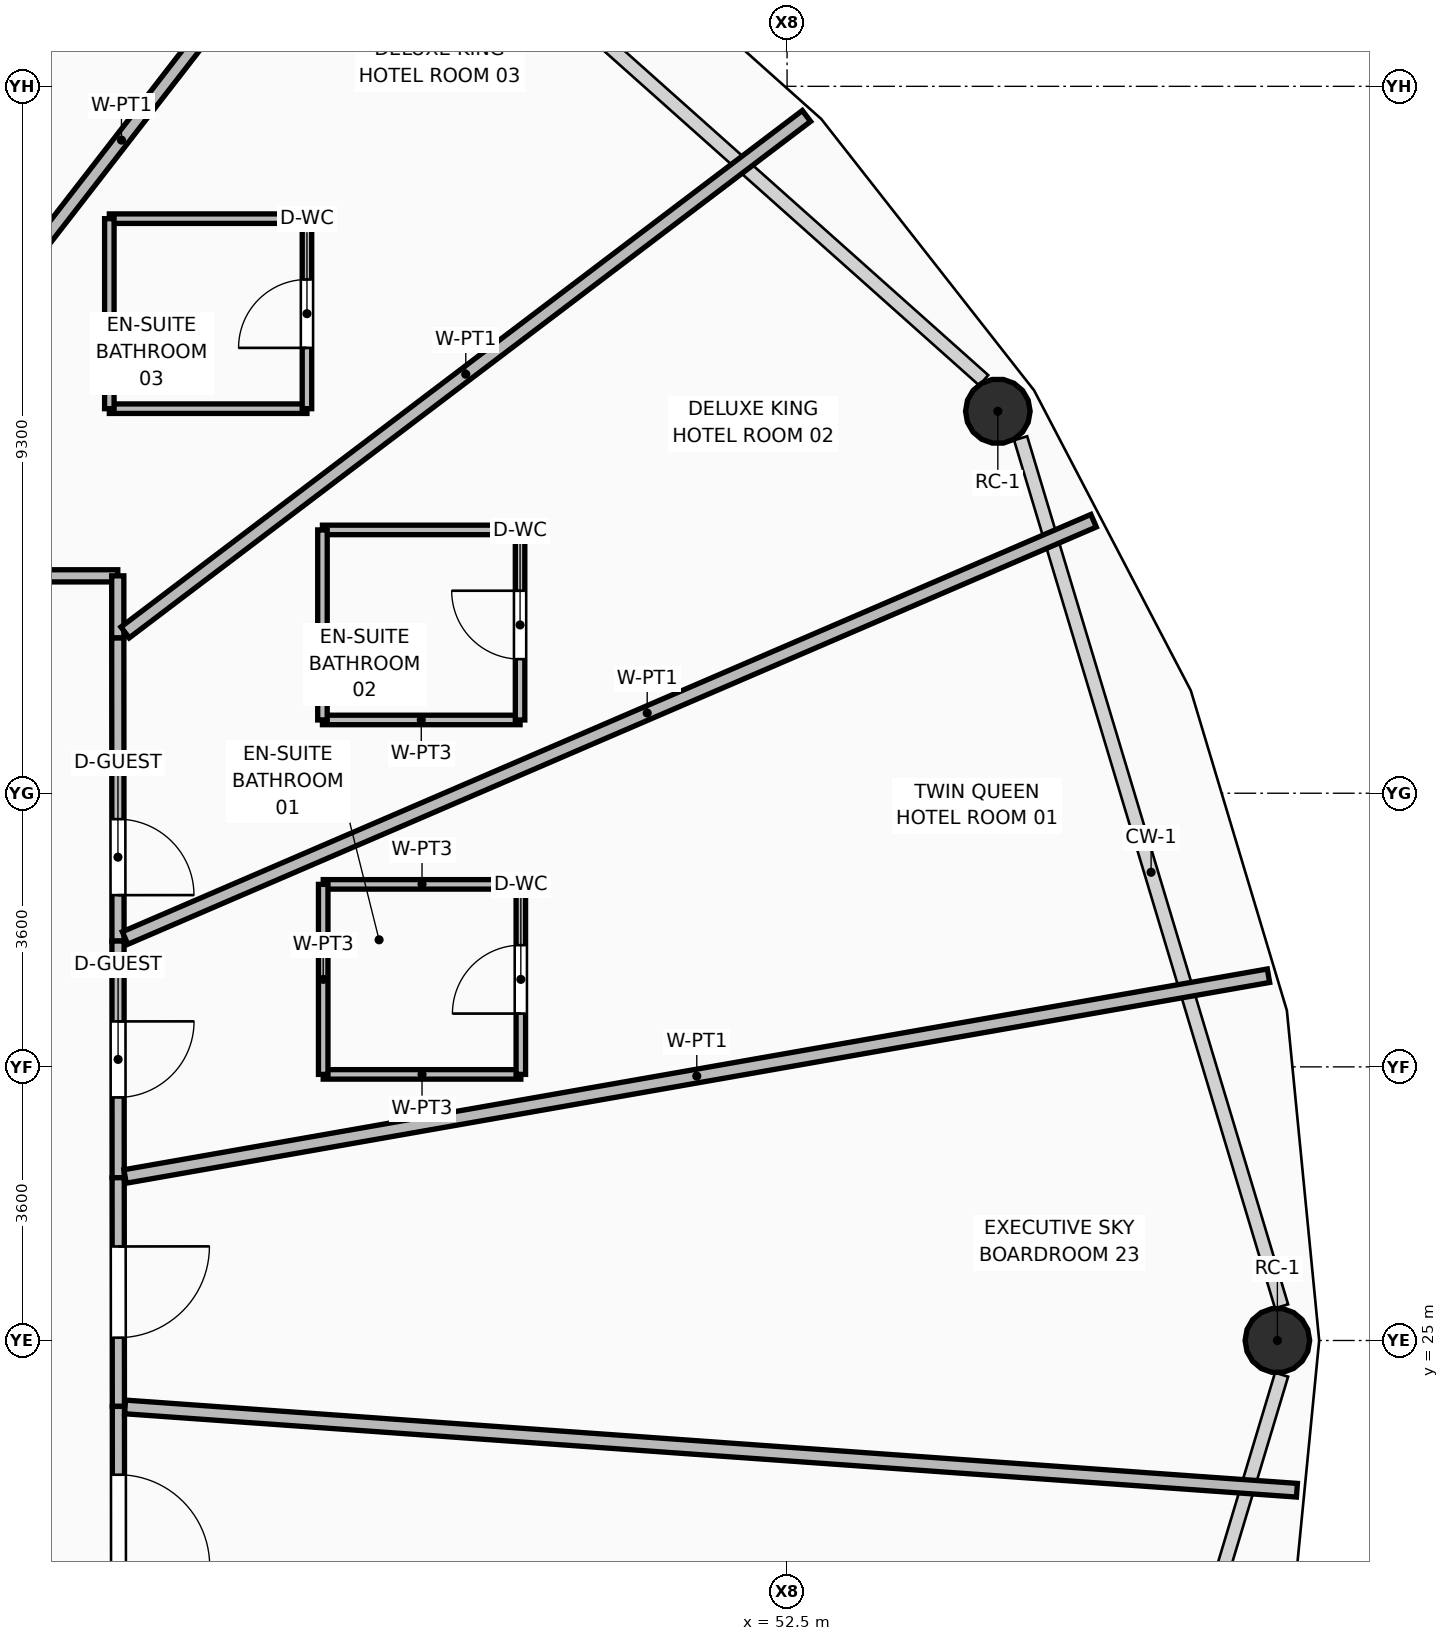
"""IFC4 building model, lengths in metres.
Left out: names, types, materials, properties, quantities, classifications, styles, units other than length and angle.
Written with IfcOpenShell. Run it as: python <this file> out.ifc"""

import sys

from ifc_helpers import new_model, si_unit, direction, frame, frame_2d, origin, origin_2d, place, context, subcontext, project, spatial, rectangle, hollow_circle, extrude, element, fill, save


model = new_model("IFC4")
c1 = context("Model", 3, precision=1e-05, world=origin(), true_north=direction((0.0, 1.0)))
c2 = subcontext(c1, "Body", "Model", "MODEL_VIEW")
j1 = project(units=[si_unit("LENGTHUNIT", "METRE"), si_unit("PLANEANGLEUNIT", "RADIAN")], contexts=[c1])
p1 = place(None, origin())
s1 = spatial("IfcSite", under=j1, at=p1, CompositionType="ELEMENT")
p2 = place(p1, origin())
s2 = spatial("IfcBuilding", under=s1, at=p2, CompositionType="ELEMENT")
p3 = place(p2, frame((0.0, 0.0, 64.5)))
s3 = spatial("IfcBuildingStorey", under=s2, at=p3, CompositionType="ELEMENT", Elevation=64.5)
p4 = place(p3, frame((58.951, 25.0, 0.0), z_axis=(0.055647755416, 0.0, 0.998450463126), x_axis=(0.0, 1.0, 0.0)))
e1 = element("IfcColumn", 1, at=p4, inside=s3, PredefinedType="COLUMN", context=c2, shape_type="SweptSolid", body=[
    extrude(hollow_circle(Radius=0.425, WallThickness=0.04, at=origin_2d()), origin(), (0.0, 0.0, 1.0), 3.576),
])
p5 = place(p3, frame((55.273, 37.225, 0.0), z_axis=(0.046416301988, 0.02383009016, 0.998637899197), x_axis=(-0.456724176891, 0.889608355538, 0.0)))
e2 = element("IfcColumn", 2, at=p5, inside=s3, PredefinedType="COLUMN", context=c2, shape_type="SweptSolid", body=[
    extrude(hollow_circle(Radius=0.425, WallThickness=0.04, at=origin_2d()), origin(), (0.0, 0.0, 1.0), 3.729),
])
p6 = place(p3, frame((39.299, 35.06, 0.0), z_axis=(0.0, 0.0, 1.0), x_axis=(1.0, 0.0, 0.0)))
e3 = element("IfcWall", 3, at=p6, inside=s3, PredefinedType="PARTITIONING", context=c2, shape_type="SweptSolid", body=[
    extrude(rectangle(XDim=4.395, YDim=0.16, at=frame_2d((2.198, 0.0))), origin(), (0.0, 0.0, 1.0), 2.888),
])
p7 = place(p6, frame((0.599, 0.0, 0.0)))
e4 = element("IfcOpeningElement", 4, at=p7, cuts=e3, PredefinedType="OPENING", context=c2, shape_type="SweptSolid", body=[
    extrude(rectangle(XDim=1.0, YDim=2.1, at=frame_2d((0.5, 1.05))), frame((0.0, 0.09, 0.0), z_axis=(0.0, -1.0, 0.0), x_axis=(1.0, 0.0, 0.0)), (0.0, 0.0, 1.0), 0.18),
])
p8 = place(p3, frame((43.694, 35.06, 0.0), z_axis=(0.0, 0.0, 1.0), x_axis=(0.0, -1.0, 0.0)))
e5 = element("IfcWall", 5, at=p8, inside=s3, PredefinedType="PARTITIONING", context=c2, shape_type="SweptSolid", body=[
    extrude(rectangle(XDim=0.818, YDim=0.16, at=frame_2d((0.409, 0.0))), origin(), (0.0, 0.0, 1.0), 3.55),
])
p9 = place(p3, frame((43.694, 34.242, 0.0), z_axis=(0.0, 0.0, 1.0), x_axis=(0.00073479865, -0.999999730035, 0.0)))
e6 = element("IfcWall", 6, at=p9, inside=s3, PredefinedType="PARTITIONING", context=c2, shape_type="SweptSolid", body=[
    extrude(rectangle(XDim=3.987, YDim=0.16, at=frame_2d((1.994, 0.0))), origin(), (0.0, 0.0, 1.0), 2.888),
])
p10 = place(p9, frame((2.383, 0.0, 0.0)))
e7 = element("IfcOpeningElement", 7, at=p10, cuts=e6, PredefinedType="OPENING", context=c2, shape_type="SweptSolid", body=[
    extrude(rectangle(XDim=1.0, YDim=2.1, at=frame_2d((0.5, 1.05))), frame((0.0, 0.09, 0.0), z_axis=(0.0, -1.0, 0.0), x_axis=(1.0, 0.0, 0.0)), (0.0, 0.0, 1.0), 0.18),
])
p11 = place(p3, frame((43.697, 30.255, 0.0), z_axis=(0.0, 0.0, 1.0), x_axis=(0.000627450857, -0.999999803153, 0.0)))
e8 = element("IfcWall", 8, at=p11, inside=s3, PredefinedType="PARTITIONING", context=c2, shape_type="SweptSolid", body=[
    extrude(rectangle(XDim=3.113, YDim=0.16, at=frame_2d((1.556, 0.0))), origin(), (0.0, 0.0, 1.0), 3.55),
])
p12 = place(p11, frame((1.057, 0.0, 0.0)))
e9 = element("IfcOpeningElement", 9, at=p12, cuts=e8, PredefinedType="OPENING", context=c2, shape_type="SweptSolid", body=[
    extrude(rectangle(XDim=1.0, YDim=2.1, at=frame_2d((0.5, 1.05))), frame((0.0, 0.09, 0.0), z_axis=(0.0, -1.0, 0.0), x_axis=(1.0, 0.0, 0.0)), (0.0, 0.0, 1.0), 0.18),
])
p13 = place(p3, frame((43.699, 27.142, 0.0), z_axis=(0.0, 0.0, 1.0), x_axis=(0.00097363037, -0.999999526022, 0.0)))
e10 = element("IfcWall", 10, at=p13, inside=s3, PredefinedType="PARTITIONING", context=c2, shape_type="SweptSolid", body=[
    extrude(rectangle(XDim=3.009, YDim=0.16, at=frame_2d((1.504, 0.0))), origin(), (0.0, 0.0, 1.0), 3.55),
])
p14 = place(p13, frame((0.905, 0.0, 0.0)))
e11 = element("IfcOpeningElement", 11, at=p14, cuts=e10, PredefinedType="OPENING", context=c2, shape_type="SweptSolid", body=[
    extrude(rectangle(XDim=1.2, YDim=2.1, at=frame_2d((0.6, 1.05))), frame((0.0, 0.09, 0.0), z_axis=(0.0, -1.0, 0.0), x_axis=(1.0, 0.0, 0.0)), (0.0, 0.0, 1.0), 0.18),
])
p15 = place(p3, frame((43.702, 24.133, 0.0), z_axis=(0.0, 0.0, 1.0), x_axis=(0.000698649108, -0.999999755945, 0.0)))
e12 = element("IfcWall", 12, at=p15, inside=s3, PredefinedType="PARTITIONING", context=c2, shape_type="SweptSolid", body=[
    extrude(rectangle(XDim=3.145, YDim=0.16, at=frame_2d((1.573, 0.0))), origin(), (0.0, 0.0, 1.0), 2.928),
])
p16 = place(p15, frame((0.899, 0.0, 0.0)))
e13 = element("IfcOpeningElement", 13, at=p16, cuts=e12, PredefinedType="OPENING", context=c2, shape_type="SweptSolid", body=[
    extrude(rectangle(XDim=1.2, YDim=2.1, at=frame_2d((0.6, 1.05))), frame((0.0, 0.09, 0.0), z_axis=(0.0, -1.0, 0.0), x_axis=(1.0, 0.0, 0.0)), (0.0, 0.0, 1.0), 0.18),
])
p17 = place(p3, frame((43.79, 27.158, 0.0), z_axis=(0.0, 0.0, 1.0), x_axis=(0.984936685783, 0.172915369471, 0.0)))
e14 = element("IfcWall", 14, at=p17, inside=s3, PredefinedType="PARTITIONING", context=c2, shape_type="SweptSolid", body=[
    extrude(rectangle(XDim=15.274, YDim=0.18, at=frame_2d((7.637, 0.0))), origin(), (0.0, 0.0, 1.0), 2.735),
])
p18 = place(p3, frame((43.79, 30.295, 0.0), z_axis=(0.0, 0.0, 1.0), x_axis=(0.918393435046, 0.395668419846, 0.0)))
e15 = element("IfcWall", 15, at=p18, inside=s3, PredefinedType="PARTITIONING", context=c2, shape_type="SweptSolid", body=[
    extrude(rectangle(XDim=13.875, YDim=0.18, at=frame_2d((6.938, 0.0))), origin(), (0.0, 0.0, 1.0), 2.735),
])
p19 = place(p3, frame((43.79, 34.315, 0.0), z_axis=(0.0, 0.0, 1.0), x_axis=(0.796937326032, 0.604061998786, 0.0)))
e16 = element("IfcWall", 16, at=p19, inside=s3, PredefinedType="PARTITIONING", context=c2, shape_type="SweptSolid", body=[
    extrude(rectangle(XDim=11.249, YDim=0.18, at=frame_2d((5.625, 0.0))), origin(), (0.0, 0.0, 1.0), 2.735),
])
p20 = place(p3, frame((39.361, 35.14, 0.0), z_axis=(0.0, 0.0, 1.0), x_axis=(0.612637755807, 0.790363827714, 0.0)))
e17 = element("IfcWall", 17, at=p20, inside=s3, PredefinedType="PARTITIONING", context=c2, shape_type="SweptSolid", body=[
    extrude(rectangle(XDim=12.981, YDim=0.18, at=frame_2d((6.491, 0.0))), origin(), (0.0, 0.0, 1.0), 2.735),
])
p21 = place(p3, frame((43.79, 24.126, 0.0), z_axis=(0.0, 0.0, 1.0), x_axis=(0.997483174991, -0.070903565565, 0.0)))
e18 = element("IfcWall", 18, at=p21, inside=s3, PredefinedType="PARTITIONING", context=c2, shape_type="SweptSolid", body=[
    extrude(rectangle(XDim=15.457, YDim=0.18, at=frame_2d((7.729, 0.0))), origin(), (0.0, 0.0, 1.0), 2.775),
])
for number, where, z_axis, x_axis in (
    (19, (46.397, 28.501, 0.0), (0.0, 0.0, 1.0), (1.0, 0.0, 0.0)),
    (20, (46.397, 31.001, 0.0), (0.0, 0.0, 1.0), (1.0, 0.0, 0.0)),
):
    element("IfcWall", number, at=place(p3, frame(where, z_axis=z_axis, x_axis=x_axis)), inside=s3, PredefinedType="PARTITIONING", context=c2, shape_type="SweptSolid", body=[
        extrude(rectangle(XDim=2.6, YDim=0.125, at=frame_2d((1.3, 0.0))), origin(), (0.0, 0.0, 1.0), 3.55),
    ])
p22 = place(p3, frame((46.397, 28.501, 0.0), z_axis=(0.0, 0.0, 1.0), x_axis=(0.0, 1.0, 0.0)))
e21 = element("IfcWall", 21, at=p22, inside=s3, PredefinedType="PARTITIONING", context=c2, shape_type="SweptSolid", body=[
    extrude(rectangle(XDim=2.5, YDim=0.125, at=frame_2d((1.25, 0.0))), origin(), (0.0, 0.0, 1.0), 3.55),
])
p23 = place(p3, frame((48.997, 28.501, 0.0), z_axis=(0.0, 0.0, 1.0), x_axis=(0.0, 1.0, 0.0)))
e22 = element("IfcWall", 22, at=p23, inside=s3, PredefinedType="PARTITIONING", context=c2, shape_type="SweptSolid", body=[
    extrude(rectangle(XDim=2.5, YDim=0.125, at=frame_2d((1.25, 0.0))), origin(), (0.0, 0.0, 1.0), 3.55),
])
p24 = place(p23, frame((0.8, 0.0, 0.0)))
e23 = element("IfcOpeningElement", 23, at=p24, cuts=e22, PredefinedType="OPENING", context=c2, shape_type="SweptSolid", body=[
    extrude(rectangle(XDim=0.9, YDim=2.1, at=frame_2d((0.45, 1.05))), frame((0.0, 0.073, 0.0), z_axis=(0.0, -1.0, 0.0), x_axis=(1.0, 0.0, 0.0)), (0.0, 0.0, 1.0), 0.145),
])
for number, where, z_axis, x_axis in (
    (24, (46.387, 33.164, 0.0), (0.0, 0.0, 1.0), (1.0, 0.0, 0.0)),
    (25, (46.387, 35.664, 0.0), (0.0, 0.0, 1.0), (1.0, 0.0, 0.0)),
):
    element("IfcWall", number, at=place(p3, frame(where, z_axis=z_axis, x_axis=x_axis)), inside=s3, PredefinedType="PARTITIONING", context=c2, shape_type="SweptSolid", body=[
        extrude(rectangle(XDim=2.6, YDim=0.125, at=frame_2d((1.3, 0.0))), origin(), (0.0, 0.0, 1.0), 3.55),
    ])
p25 = place(p3, frame((46.387, 33.164, 0.0), z_axis=(0.0, 0.0, 1.0), x_axis=(0.0, 1.0, 0.0)))
e26 = element("IfcWall", 26, at=p25, inside=s3, PredefinedType="PARTITIONING", context=c2, shape_type="SweptSolid", body=[
    extrude(rectangle(XDim=2.5, YDim=0.125, at=frame_2d((1.25, 0.0))), origin(), (0.0, 0.0, 1.0), 2.888),
])
p26 = place(p3, frame((48.987, 33.164, 0.0), z_axis=(0.0, 0.0, 1.0), x_axis=(0.0, 1.0, 0.0)))
e27 = element("IfcWall", 27, at=p26, inside=s3, PredefinedType="PARTITIONING", context=c2, shape_type="SweptSolid", body=[
    extrude(rectangle(XDim=2.5, YDim=0.125, at=frame_2d((1.25, 0.0))), origin(), (0.0, 0.0, 1.0), 2.888),
])
p27 = place(p26, frame((0.8, 0.0, 0.0)))
e28 = element("IfcOpeningElement", 28, at=p27, cuts=e27, PredefinedType="OPENING", context=c2, shape_type="SweptSolid", body=[
    extrude(rectangle(XDim=0.9, YDim=2.1, at=frame_2d((0.45, 1.05))), frame((0.0, 0.073, 0.0), z_axis=(0.0, -1.0, 0.0), x_axis=(1.0, 0.0, 0.0)), (0.0, 0.0, 1.0), 0.145),
])
p28 = place(p3, frame((43.583, 37.259, 0.0), z_axis=(0.0, 0.0, 1.0), x_axis=(1.0, 0.0, 0.0)))
e29 = element("IfcWall", 29, at=p28, inside=s3, PredefinedType="PARTITIONING", context=c2, shape_type="SweptSolid", body=[
    extrude(rectangle(XDim=2.6, YDim=0.125, at=frame_2d((1.3, 0.0))), origin(), (0.0, 0.0, 1.0), 3.178),
])
p29 = place(p3, frame((43.583, 39.759, 0.0), z_axis=(0.0, 0.0, 1.0), x_axis=(1.0, 0.0, 0.0)))
e30 = element("IfcWall", 30, at=p29, inside=s3, PredefinedType="PARTITIONING", context=c2, shape_type="SweptSolid", body=[
    extrude(rectangle(XDim=2.6, YDim=0.125, at=frame_2d((1.3, 0.0))), origin(), (0.0, 0.0, 1.0), 2.888),
])
p30 = place(p3, frame((43.583, 37.259, 0.0), z_axis=(0.0, 0.0, 1.0), x_axis=(0.0, 1.0, 0.0)))
e31 = element("IfcWall", 31, at=p30, inside=s3, PredefinedType="PARTITIONING", context=c2, shape_type="SweptSolid", body=[
    extrude(rectangle(XDim=2.5, YDim=0.125, at=frame_2d((1.25, 0.0))), origin(), (0.0, 0.0, 1.0), 2.888),
])
p31 = place(p3, frame((46.183, 37.259, 0.0), z_axis=(0.0, 0.0, 1.0), x_axis=(0.0, 1.0, 0.0)))
e32 = element("IfcWall", 32, at=p31, inside=s3, PredefinedType="PARTITIONING", context=c2, shape_type="SweptSolid", body=[
    extrude(rectangle(XDim=2.5, YDim=0.125, at=frame_2d((1.25, 0.0))), origin(), (0.0, 0.0, 1.0), 3.178),
])
p32 = place(p31, frame((0.8, 0.0, 0.0)))
e33 = element("IfcOpeningElement", 33, at=p32, cuts=e32, PredefinedType="OPENING", context=c2, shape_type="SweptSolid", body=[
    extrude(rectangle(XDim=0.9, YDim=2.1, at=frame_2d((0.45, 1.05))), frame((0.0, 0.073, 0.0), z_axis=(0.0, -1.0, 0.0), x_axis=(1.0, 0.0, 0.0)), (0.0, 0.0, 1.0), 0.145),
])
p33 = place(p24, origin())
e34 = element("IfcDoor", 34, at=p33, inside=s3, OperationType="SINGLE_SWING_LEFT", PredefinedType="DOOR", context=c2, shape_type="SweptSolid", body=[
    extrude(rectangle(XDim=0.9, YDim=2.1, at=frame_2d((0.45, 1.05))), frame((0.0, 0.025, 0.0), z_axis=(0.0, -1.0, 0.0), x_axis=(1.0, 0.0, 0.0)), (0.0, 0.0, 1.0), 0.05),
])
fill(e23, e34)
p34 = place(p12, origin())
e35 = element("IfcDoor", 35, at=p34, inside=s3, OperationType="SINGLE_SWING_LEFT", PredefinedType="DOOR", context=c2, shape_type="SweptSolid", body=[
    extrude(rectangle(XDim=1.0, YDim=2.1, at=frame_2d((0.5, 1.05))), frame((0.0, 0.025, 0.0), z_axis=(0.0, -1.0, 0.0), x_axis=(1.0, 0.0, 0.0)), (0.0, 0.0, 1.0), 0.05),
])
fill(e9, e35)
p35 = place(p27, origin())
e36 = element("IfcDoor", 36, at=p35, inside=s3, OperationType="SINGLE_SWING_RIGHT", PredefinedType="DOOR", context=c2, shape_type="SweptSolid", body=[
    extrude(rectangle(XDim=0.9, YDim=2.1, at=frame_2d((0.45, 1.05))), frame((0.0, 0.025, 0.0), z_axis=(0.0, -1.0, 0.0), x_axis=(1.0, 0.0, 0.0)), (0.0, 0.0, 1.0), 0.05),
])
fill(e28, e36)
p36 = place(p10, origin())
e37 = element("IfcDoor", 37, at=p36, inside=s3, OperationType="SINGLE_SWING_RIGHT", PredefinedType="DOOR", context=c2, shape_type="SweptSolid", body=[
    extrude(rectangle(XDim=1.0, YDim=2.1, at=frame_2d((0.5, 1.05))), frame((0.0, 0.025, 0.0), z_axis=(0.0, -1.0, 0.0), x_axis=(1.0, 0.0, 0.0)), (0.0, 0.0, 1.0), 0.05),
])
fill(e7, e37)
p37 = place(p32, origin())
e38 = element("IfcDoor", 38, at=p37, inside=s3, OperationType="SINGLE_SWING_LEFT", PredefinedType="DOOR", context=c2, shape_type="SweptSolid", body=[
    extrude(rectangle(XDim=0.9, YDim=2.1, at=frame_2d((0.45, 1.05))), frame((0.0, 0.025, 0.0), z_axis=(0.0, -1.0, 0.0), x_axis=(1.0, 0.0, 0.0)), (0.0, 0.0, 1.0), 0.05),
])
fill(e33, e38)
p38 = place(p16, origin())
e39 = element("IfcDoor", 39, at=p38, inside=s3, OperationType="SINGLE_SWING_RIGHT", PredefinedType="DOOR", context=c2, shape_type="SweptSolid", body=[
    extrude(rectangle(XDim=1.2, YDim=2.1, at=frame_2d((0.6, 1.05))), frame((0.0, 0.025, 0.0), z_axis=(0.0, -1.0, 0.0), x_axis=(1.0, 0.0, 0.0)), (0.0, 0.0, 1.0), 0.05),
])
fill(e13, e39)
p39 = place(p14, origin())
e40 = element("IfcDoor", 40, at=p39, inside=s3, OperationType="SINGLE_SWING_LEFT", PredefinedType="DOOR", context=c2, shape_type="SweptSolid", body=[
    extrude(rectangle(XDim=1.2, YDim=2.1, at=frame_2d((0.6, 1.05))), frame((0.0, 0.025, 0.0), z_axis=(0.0, -1.0, 0.0), x_axis=(1.0, 0.0, 0.0)), (0.0, 0.0, 1.0), 0.05),
])
fill(e11, e40)
save(model, sys.argv[1])
